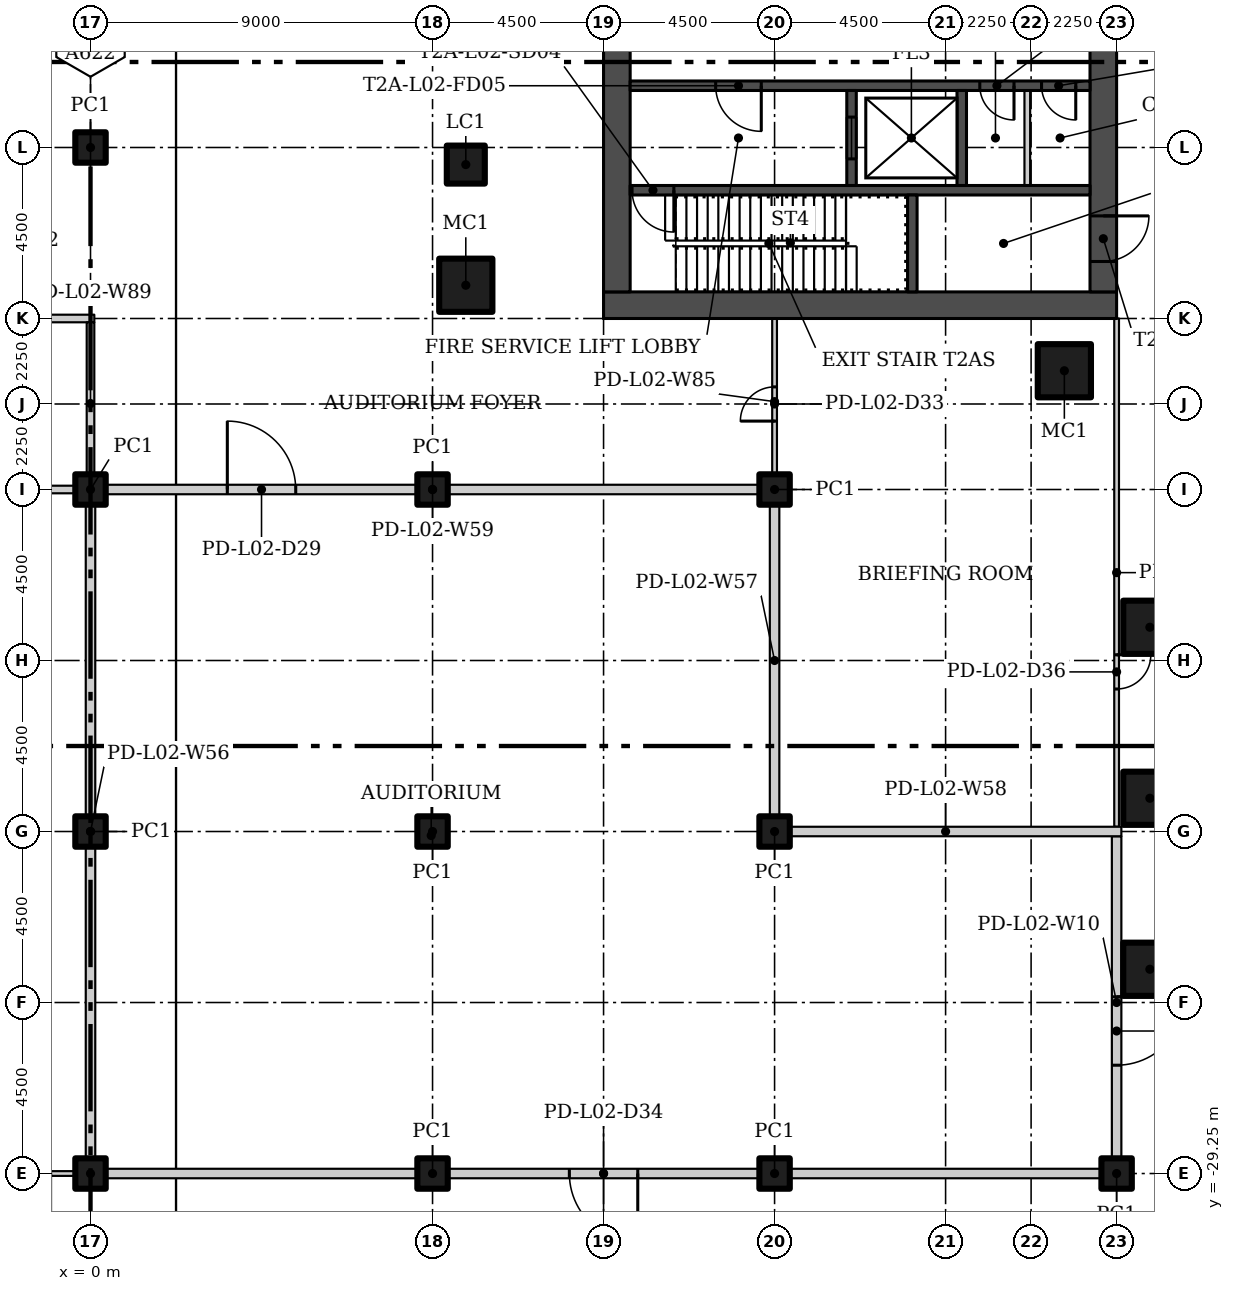
"""IFC4 building model, lengths in metres.
Left out: names, types, materials, properties, quantities, classifications, styles, units other than length and angle.
Written with IfcOpenShell. Run it as: python <this file> out.ifc"""

import sys

from ifc_helpers import new_model, si_unit, direction, frame, frame_2d, origin, origin_2d, place, context, subcontext, project, spatial, rectangle, hollow_rectangle, extrude, element, fill, save


model = new_model("IFC4")
c1 = context("Model", 3, precision=1e-05, world=origin(), true_north=direction((0.0, 1.0)))
c2 = subcontext(c1, "Body", "Model", "MODEL_VIEW")
j1 = project(units=[si_unit("LENGTHUNIT", "METRE"), si_unit("PLANEANGLEUNIT", "RADIAN")], contexts=[c1])
p1 = place(None, origin())
s1 = spatial("IfcSite", under=j1, at=p1, CompositionType="ELEMENT")
p2 = place(p1, origin())
s2 = spatial("IfcBuilding", under=s1, at=p2, CompositionType="ELEMENT")
p3 = place(p2, frame((0.0, 0.0, 12.5)))
s3 = spatial("IfcBuildingStorey", under=s2, at=p3, CompositionType="ELEMENT", Elevation=12.5)
for number, where in (
    (1, (25.625, -8.125, 0.0)),
    (2, (27.875, -14.875, 0.0)),
    (3, (27.875, -19.375, 0.0)),
    (4, (27.875, -23.875, 0.0)),
    (5, (9.875, -5.875, 0.0)),
):
    element("IfcColumn", number, at=place(p3, frame(where)), inside=s3, PredefinedType="COLUMN", context=c2, shape_type="SweptSolid", body=[
        extrude(hollow_rectangle(XDim=1.4, YDim=1.4, WallThickness=0.06, at=origin_2d()), origin(), (0.0, 0.0, 1.0), 5.6),
    ])
for number, where in (
    (6, (0.0, -29.25, 0.0)),
    (7, (0.0, -20.25, 0.0)),
    (8, (0.0, -11.25, 0.0)),
    (9, (0.0, -2.25, 0.0)),
    (10, (9.0, -29.25, 0.0)),
    (11, (9.0, -20.25, 0.0)),
    (12, (9.0, -11.25, 0.0)),
    (13, (18.0, -29.25, 0.0)),
    (14, (18.0, -20.25, 0.0)),
    (15, (18.0, -11.25, 0.0)),
    (16, (27.0, -29.25, 0.0)),
):
    element("IfcColumn", number, at=place(p3, frame(where)), inside=s3, PredefinedType="COLUMN", context=c2, shape_type="SweptSolid", body=[
        extrude(hollow_rectangle(XDim=0.8, YDim=0.8, WallThickness=0.03, at=origin_2d()), origin(), (0.0, 0.0, 1.0), 5.6),
    ])
p4 = place(p3, frame((9.875, -2.7, 0.0)))
e17 = element("IfcColumn", 17, at=p4, inside=s3, PredefinedType="COLUMN", context=c2, shape_type="SweptSolid", body=[
    extrude(hollow_rectangle(XDim=1.0, YDim=1.0, WallThickness=0.04, at=origin_2d()), origin(), (0.0, 0.0, 1.0), 5.6),
])
p5 = place(p3, frame((27.0, -20.375, 0.0), z_axis=(0.0, 0.0, 1.0), x_axis=(0.0, -1.0, 0.0)))
e18 = element("IfcWall", 18, at=p5, inside=s3, PredefinedType="PARTITIONING", context=c2, shape_type="SweptSolid", body=[
    extrude(rectangle(XDim=8.75, YDim=0.25, at=frame_2d((4.375, 0.0))), origin(), (0.0, 0.0, 1.0), 5.6),
])
p6 = place(p5, frame((4.225, 0.0, 0.0)))
e19 = element("IfcOpeningElement", 19, at=p6, cuts=e18, PredefinedType="OPENING", context=c2, shape_type="SweptSolid", body=[
    extrude(rectangle(XDim=1.8, YDim=2.4, at=frame_2d((0.9, 1.2))), frame((0.0, 0.135, 0.0), z_axis=(0.0, -1.0, 0.0), x_axis=(1.0, 0.0, 0.0)), (0.0, 0.0, 1.0), 0.27),
])
p7 = place(p3, frame((27.0, -6.75, 0.0), z_axis=(0.0, 0.0, 1.0), x_axis=(0.0, -1.0, 0.0)))
e20 = element("IfcWall", 20, at=p7, inside=s3, PredefinedType="PARTITIONING", context=c2, shape_type="SweptSolid", body=[
    extrude(rectangle(XDim=13.375, YDim=0.125, at=frame_2d((6.688, 0.0))), origin(), (0.0, 0.0, 1.0), 5.6),
])
p8 = place(p7, frame((8.85, 0.0, 0.0)))
e21 = element("IfcOpeningElement", 21, at=p8, cuts=e20, PredefinedType="OPENING", context=c2, shape_type="SweptSolid", body=[
    extrude(rectangle(XDim=0.9, YDim=2.1, at=frame_2d((0.45, 1.05))), frame((0.0, 0.073, 0.0), z_axis=(0.0, -1.0, 0.0), x_axis=(1.0, 0.0, 0.0)), (0.0, 0.0, 1.0), 0.145),
])
p9 = place(p3, frame((0.1, -6.75, 0.0), z_axis=(0.0, 0.0, 1.0), x_axis=(-1.0, 0.0, 0.0)))
e22 = element("IfcWall", 22, at=p9, inside=s3, PredefinedType="PARTITIONING", context=c2, shape_type="SweptSolid", body=[
    extrude(rectangle(XDim=9.2, YDim=0.2, at=frame_2d((4.6, 0.0))), origin(), (0.0, 0.0, 1.0), 5.6),
])
p10 = place(p9, frame((3.25, 0.0, 0.0)))
e23 = element("IfcOpeningElement", 23, at=p10, cuts=e22, PredefinedType="OPENING", context=c2, shape_type="SweptSolid", body=[
    extrude(rectangle(XDim=1.5, YDim=2.1, at=frame_2d((0.75, 1.05))), frame((0.0, 0.11, 0.0), z_axis=(0.0, -1.0, 0.0), x_axis=(1.0, 0.0, 0.0)), (0.0, 0.0, 1.0), 0.22),
])
p11 = place(p3, frame((27.125, -29.25, 0.0), z_axis=(0.0, 0.0, 1.0), x_axis=(-1.0, 0.0, 0.0)))
e24 = element("IfcWall", 24, at=p11, inside=s3, PredefinedType="PARTITIONING", context=c2, shape_type="SweptSolid", body=[
    extrude(rectangle(XDim=27.25, YDim=0.25, at=frame_2d((13.625, 0.0))), origin(), (0.0, 0.0, 1.0), 5.6),
])
p12 = place(p11, frame((12.725, 0.0, 0.0)))
e25 = element("IfcOpeningElement", 25, at=p12, cuts=e24, PredefinedType="OPENING", context=c2, shape_type="SweptSolid", body=[
    extrude(rectangle(XDim=1.8, YDim=2.4, at=frame_2d((0.9, 1.2))), frame((0.0, 0.135, 0.0), z_axis=(0.0, -1.0, 0.0), x_axis=(1.0, 0.0, 0.0)), (0.0, 0.0, 1.0), 0.27),
])
p13 = place(p3, frame((0.125, -29.25, 0.0), z_axis=(0.0, 0.0, 1.0), x_axis=(-1.0, 0.0, 0.0)))
e26 = element("IfcWall", 26, at=p13, inside=s3, PredefinedType="PARTITIONING", context=c2, shape_type="SweptSolid", body=[
    extrude(rectangle(XDim=9.225, YDim=0.125, at=frame_2d((4.613, 0.0))), origin(), (0.0, 0.0, 1.0), 5.6),
])
p14 = place(p13, frame((1.175, 0.0, 0.0)))
e27 = element("IfcOpeningElement", 27, at=p14, cuts=e26, PredefinedType="OPENING", context=c2, shape_type="SweptSolid", body=[
    extrude(rectangle(XDim=1.5, YDim=2.1, at=frame_2d((0.75, 1.05))), frame((0.0, 0.073, 0.0), z_axis=(0.0, -1.0, 0.0), x_axis=(1.0, 0.0, 0.0)), (0.0, 0.0, 1.0), 0.145),
])
p15 = place(p13, frame((6.575, 0.0, 0.0)))
e28 = element("IfcOpeningElement", 28, at=p15, cuts=e26, PredefinedType="OPENING", context=c2, shape_type="SweptSolid", body=[
    extrude(rectangle(XDim=1.5, YDim=2.1, at=frame_2d((0.75, 1.05))), frame((0.0, 0.073, 0.0), z_axis=(0.0, -1.0, 0.0), x_axis=(1.0, 0.0, 0.0)), (0.0, 0.0, 1.0), 0.145),
])
p16 = place(p3, frame((0.0, -11.375, 0.0), z_axis=(0.0, 0.0, 1.0), x_axis=(0.0, -1.0, 0.0)))
e29 = element("IfcWall", 29, at=p16, inside=s3, PredefinedType="PARTITIONING", context=c2, shape_type="SweptSolid", body=[
    extrude(rectangle(XDim=17.75, YDim=0.25, at=frame_2d((8.875, 0.0))), origin(), (0.0, 0.0, 1.0), 5.6),
])
p17 = place(p3, frame((18.0, -20.125, 0.0), z_axis=(0.0, 0.0, 1.0), x_axis=(0.0, 1.0, 0.0)))
e30 = element("IfcWall", 30, at=p17, inside=s3, PredefinedType="PARTITIONING", context=c2, shape_type="SweptSolid", body=[
    extrude(rectangle(XDim=8.75, YDim=0.25, at=frame_2d((4.375, 0.0))), origin(), (0.0, 0.0, 1.0), 5.6),
])
p18 = place(p3, frame((27.125, -20.25, 0.0), z_axis=(0.0, 0.0, 1.0), x_axis=(-1.0, 0.0, 0.0)))
e31 = element("IfcWall", 31, at=p18, inside=s3, PredefinedType="PARTITIONING", context=c2, shape_type="SweptSolid", body=[
    extrude(rectangle(XDim=9.25, YDim=0.25, at=frame_2d((4.625, 0.0))), origin(), (0.0, 0.0, 1.0), 5.6),
])
p19 = place(p3, frame((-0.125, -11.25, 0.0)))
e32 = element("IfcWall", 32, at=p19, inside=s3, PredefinedType="PARTITIONING", context=c2, shape_type="SweptSolid", body=[
    extrude(rectangle(XDim=18.25, YDim=0.25, at=frame_2d((9.125, 0.0))), origin(), (0.0, 0.0, 1.0), 5.6),
])
p20 = place(p19, frame((3.725, 0.0, 0.0)))
e33 = element("IfcOpeningElement", 33, at=p20, cuts=e32, PredefinedType="OPENING", context=c2, shape_type="SweptSolid", body=[
    extrude(rectangle(XDim=1.8, YDim=2.4, at=frame_2d((0.9, 1.2))), frame((0.0, 0.135, 0.0), z_axis=(0.0, -1.0, 0.0), x_axis=(1.0, 0.0, 0.0)), (0.0, 0.0, 1.0), 0.27),
])
p21 = place(p3, frame((0.125, -11.25, 0.0), z_axis=(0.0, 0.0, 1.0), x_axis=(-1.0, 0.0, 0.0)))
e34 = element("IfcWall", 34, at=p21, inside=s3, PredefinedType="PARTITIONING", context=c2, shape_type="SweptSolid", body=[
    extrude(rectangle(XDim=27.225, YDim=0.2, at=frame_2d((13.613, 0.0))), origin(), (0.0, 0.0, 1.0), 5.6),
])
p22 = place(p3, frame((18.0, -11.125, 0.0), z_axis=(0.0, 0.0, 1.0), x_axis=(0.0, 1.0, 0.0)))
e35 = element("IfcWall", 35, at=p22, inside=s3, PredefinedType="PARTITIONING", context=c2, shape_type="SweptSolid", body=[
    extrude(rectangle(XDim=4.375, YDim=0.125, at=frame_2d((2.188, 0.0))), origin(), (0.0, 0.0, 1.0), 5.6),
])
p23 = place(p22, frame((1.675, 0.0, 0.0)))
e36 = element("IfcOpeningElement", 36, at=p23, cuts=e35, PredefinedType="OPENING", context=c2, shape_type="SweptSolid", body=[
    extrude(rectangle(XDim=0.9, YDim=2.1, at=frame_2d((0.45, 1.05))), frame((0.0, 0.073, 0.0), z_axis=(0.0, -1.0, 0.0), x_axis=(1.0, 0.0, 0.0)), (0.0, 0.0, 1.0), 0.145),
])
p24 = place(p3, frame((0.0, -11.125, 0.0), z_axis=(0.0, 0.0, 1.0), x_axis=(0.0, 1.0, 0.0)))
e37 = element("IfcWall", 37, at=p24, inside=s3, PredefinedType="PARTITIONING", context=c2, shape_type="SweptSolid", body=[
    extrude(rectangle(XDim=4.275, YDim=0.2, at=frame_2d((2.137, 0.0))), origin(), (0.0, 0.0, 1.0), 5.6),
])
p25 = place(p3, frame((13.5, -6.4, 0.0)))
e38 = element("IfcWall", 38, at=p25, inside=s3, PredefinedType="SHEAR", context=c2, shape_type="SweptSolid", body=[
    extrude(rectangle(XDim=13.5, YDim=0.7, at=frame_2d((6.75, 0.0))), origin(), (0.0, 0.0, 1.0), 5.6),
])
p26 = place(p3, frame((13.85, 6.05, 0.0), z_axis=(0.0, 0.0, 1.0), x_axis=(0.0, -1.0, 0.0)))
e39 = element("IfcWall", 39, at=p26, inside=s3, PredefinedType="SHEAR", context=c2, shape_type="SweptSolid", body=[
    extrude(rectangle(XDim=12.1, YDim=0.7, at=frame_2d((6.05, 0.0))), origin(), (0.0, 0.0, 1.0), 5.6),
])
p27 = place(p26, frame((3.9, 0.0, 0.0)))
e40 = element("IfcOpeningElement", 40, at=p27, cuts=e39, PredefinedType="OPENING", context=c2, shape_type="SweptSolid", body=[
    extrude(rectangle(XDim=1.8, YDim=2.4, at=frame_2d((0.9, 1.2))), frame((0.0, 0.36, 0.0), z_axis=(0.0, -1.0, 0.0), x_axis=(1.0, 0.0, 0.0)), (0.0, 0.0, 1.0), 0.72),
])
p28 = place(p3, frame((26.65, 6.05, 0.0), z_axis=(0.0, 0.0, 1.0), x_axis=(0.0, -1.0, 0.0)))
e41 = element("IfcWall", 41, at=p28, inside=s3, PredefinedType="SHEAR", context=c2, shape_type="SweptSolid", body=[
    extrude(rectangle(XDim=12.1, YDim=0.7, at=frame_2d((6.05, 0.0))), origin(), (0.0, 0.0, 1.0), 5.6),
])
p29 = place(p28, frame((10.1, 0.0, 0.0)))
e42 = element("IfcOpeningElement", 42, at=p29, cuts=e41, PredefinedType="OPENING", context=c2, shape_type="SweptSolid", body=[
    extrude(rectangle(XDim=1.2, YDim=2.1, at=frame_2d((0.6, 1.05))), frame((0.0, 0.36, 0.0), z_axis=(0.0, -1.0, 0.0), x_axis=(1.0, 0.0, 0.0)), (0.0, 0.0, 1.0), 0.72),
])
p30 = place(p28, frame((3.9, 0.0, 0.0)))
e43 = element("IfcOpeningElement", 43, at=p30, cuts=e41, PredefinedType="OPENING", context=c2, shape_type="SweptSolid", body=[
    extrude(rectangle(XDim=1.8, YDim=2.4, at=frame_2d((0.9, 1.2))), frame((0.0, 0.36, 0.0), z_axis=(0.0, -1.0, 0.0), x_axis=(1.0, 0.0, 0.0)), (0.0, 0.0, 1.0), 0.72),
])
p31 = place(p3, frame((26.3, -3.375, 0.0), z_axis=(0.0, 0.0, 1.0), x_axis=(-1.0, 0.0, 0.0)))
e44 = element("IfcWall", 44, at=p31, inside=s3, PredefinedType="SHEAR", context=c2, shape_type="SweptSolid", body=[
    extrude(rectangle(XDim=12.1, YDim=0.25, at=frame_2d((6.05, 0.0))), origin(), (0.0, 0.0, 1.0), 5.6),
])
p32 = place(p31, frame((10.95, 0.0, 0.0)))
e45 = element("IfcOpeningElement", 45, at=p32, cuts=e44, PredefinedType="OPENING", context=c2, shape_type="SweptSolid", body=[
    extrude(rectangle(XDim=1.1, YDim=2.1, at=frame_2d((0.55, 1.05))), frame((0.0, 0.135, 0.0), z_axis=(0.0, -1.0, 0.0), x_axis=(1.0, 0.0, 0.0)), (0.0, 0.0, 1.0), 0.27),
])
p33 = place(p3, frame((21.625, -6.05, 0.0), z_axis=(0.0, 0.0, 1.0), x_axis=(0.0, 1.0, 0.0)))
e46 = element("IfcWall", 46, at=p33, inside=s3, PredefinedType="SHEAR", context=c2, shape_type="SweptSolid", body=[
    extrude(rectangle(XDim=2.55, YDim=0.25, at=frame_2d((1.275, 0.0))), origin(), (0.0, 0.0, 1.0), 5.6),
])
p34 = place(p3, frame((26.3, -0.625, 0.0), z_axis=(0.0, 0.0, 1.0), x_axis=(-1.0, 0.0, 0.0)))
e47 = element("IfcWall", 47, at=p34, inside=s3, PredefinedType="SHEAR", context=c2, shape_type="SweptSolid", body=[
    extrude(rectangle(XDim=12.1, YDim=0.25, at=frame_2d((6.05, 0.0))), origin(), (0.0, 0.0, 1.0), 5.6),
])
p35 = place(p34, frame((8.65, 0.0, 0.0)))
e48 = element("IfcOpeningElement", 48, at=p35, cuts=e47, PredefinedType="OPENING", context=c2, shape_type="SweptSolid", body=[
    extrude(rectangle(XDim=1.2, YDim=2.1, at=frame_2d((0.6, 1.05))), frame((0.0, 0.135, 0.0), z_axis=(0.0, -1.0, 0.0), x_axis=(1.0, 0.0, 0.0)), (0.0, 0.0, 1.0), 0.27),
])
p36 = place(p34, frame((2.0, 0.0, 0.0)))
e49 = element("IfcOpeningElement", 49, at=p36, cuts=e47, PredefinedType="OPENING", context=c2, shape_type="SweptSolid", body=[
    extrude(rectangle(XDim=0.9, YDim=2.1, at=frame_2d((0.45, 1.05))), frame((0.0, 0.135, 0.0), z_axis=(0.0, -1.0, 0.0), x_axis=(1.0, 0.0, 0.0)), (0.0, 0.0, 1.0), 0.27),
])
p37 = place(p34, frame((0.375, 0.0, 0.0)))
e50 = element("IfcOpeningElement", 50, at=p37, cuts=e47, PredefinedType="OPENING", context=c2, shape_type="SweptSolid", body=[
    extrude(rectangle(XDim=0.9, YDim=2.1, at=frame_2d((0.45, 1.05))), frame((0.0, 0.135, 0.0), z_axis=(0.0, -1.0, 0.0), x_axis=(1.0, 0.0, 0.0)), (0.0, 0.0, 1.0), 0.27),
])
p38 = place(p3, frame((20.025, -3.25, 0.0), z_axis=(0.0, 0.0, 1.0), x_axis=(0.0, 1.0, 0.0)))
e51 = element("IfcWall", 51, at=p38, inside=s3, PredefinedType="SHEAR", context=c2, shape_type="SweptSolid", body=[
    extrude(rectangle(XDim=2.5, YDim=0.25, at=frame_2d((1.25, 0.0))), origin(), (0.0, 0.0, 1.0), 5.6),
])
p39 = place(p38, frame((0.7, 0.0, 0.0)))
e52 = element("IfcOpeningElement", 52, at=p39, cuts=e51, PredefinedType="OPENING", context=c2, shape_type="SweptSolid", body=[
    extrude(rectangle(XDim=1.1, YDim=2.1, at=frame_2d((0.55, 1.05))), frame((0.0, 0.135, 0.0), z_axis=(0.0, -1.0, 0.0), x_axis=(1.0, 0.0, 0.0)), (0.0, 0.0, 1.0), 0.27),
])
p40 = place(p3, frame((22.925, -3.25, 0.0), z_axis=(0.0, 0.0, 1.0), x_axis=(0.0, 1.0, 0.0)))
e53 = element("IfcWall", 53, at=p40, inside=s3, PredefinedType="SHEAR", context=c2, shape_type="SweptSolid", body=[
    extrude(rectangle(XDim=2.5, YDim=0.25, at=frame_2d((1.25, 0.0))), origin(), (0.0, 0.0, 1.0), 5.6),
])
p41 = place(p3, frame((24.65, -3.25, 0.0), z_axis=(0.0, 0.0, 1.0), x_axis=(0.0, 1.0, 0.0)))
e54 = element("IfcWall", 54, at=p41, inside=s3, PredefinedType="PARTITIONING", context=c2, shape_type="SweptSolid", body=[
    extrude(rectangle(XDim=2.5, YDim=0.15, at=frame_2d((1.25, 0.0))), origin(), (0.0, 0.0, 1.0), 5.6),
])
p42 = place(p20, origin())
e55 = element("IfcDoor", 55, at=p42, inside=s3, OperationType="DOUBLE_DOOR_SINGLE_SWING", PredefinedType="DOOR", context=c2, shape_type="SweptSolid", body=[
    extrude(rectangle(XDim=1.8, YDim=2.4, at=frame_2d((0.9, 1.2))), frame((0.0, 0.025, 0.0), z_axis=(0.0, -1.0, 0.0), x_axis=(1.0, 0.0, 0.0)), (0.0, 0.0, 1.0), 0.05),
])
fill(e33, e55)
p43 = place(p23, origin())
e56 = element("IfcDoor", 56, at=p43, inside=s3, OperationType="SINGLE_SWING_RIGHT", PredefinedType="DOOR", context=c2, shape_type="SweptSolid", body=[
    extrude(rectangle(XDim=0.9, YDim=2.1, at=frame_2d((0.45, 1.05))), frame((0.0, 0.025, 0.0), z_axis=(0.0, -1.0, 0.0), x_axis=(1.0, 0.0, 0.0)), (0.0, 0.0, 1.0), 0.05),
])
fill(e36, e56)
p44 = place(p12, origin())
e57 = element("IfcDoor", 57, at=p44, inside=s3, OperationType="DOUBLE_DOOR_SINGLE_SWING", PredefinedType="DOOR", context=c2, shape_type="SweptSolid", body=[
    extrude(rectangle(XDim=1.8, YDim=2.4, at=frame_2d((0.9, 1.2))), frame((0.0, 0.025, 0.0), z_axis=(0.0, -1.0, 0.0), x_axis=(1.0, 0.0, 0.0)), (0.0, 0.0, 1.0), 0.05),
])
fill(e25, e57)
p45 = place(p6, origin())
e58 = element("IfcDoor", 58, at=p45, inside=s3, OperationType="DOUBLE_DOOR_SINGLE_SWING", PredefinedType="DOOR", context=c2, shape_type="SweptSolid", body=[
    extrude(rectangle(XDim=1.8, YDim=2.4, at=frame_2d((0.9, 1.2))), frame((0.0, 0.025, 0.0), z_axis=(0.0, -1.0, 0.0), x_axis=(1.0, 0.0, 0.0)), (0.0, 0.0, 1.0), 0.05),
])
fill(e19, e58)
p46 = place(p8, origin())
e59 = element("IfcDoor", 59, at=p46, inside=s3, OperationType="SINGLE_SWING_RIGHT", PredefinedType="DOOR", context=c2, shape_type="SweptSolid", body=[
    extrude(rectangle(XDim=0.9, YDim=2.1, at=frame_2d((0.45, 1.05))), frame((0.0, 0.025, 0.0), z_axis=(0.0, -1.0, 0.0), x_axis=(1.0, 0.0, 0.0)), (0.0, 0.0, 1.0), 0.05),
])
fill(e21, e59)
p47 = place(p29, origin())
e60 = element("IfcDoor", 60, at=p47, inside=s3, OperationType="SINGLE_SWING_RIGHT", PredefinedType="DOOR", context=c2, shape_type="SweptSolid", body=[
    extrude(rectangle(XDim=1.2, YDim=2.1, at=frame_2d((0.6, 1.05))), frame((0.0, 0.025, 0.0), z_axis=(0.0, -1.0, 0.0), x_axis=(1.0, 0.0, 0.0)), (0.0, 0.0, 1.0), 0.05),
])
fill(e42, e60)
p48 = place(p32, origin())
e61 = element("IfcDoor", 61, at=p48, inside=s3, OperationType="SINGLE_SWING_RIGHT", PredefinedType="DOOR", context=c2, shape_type="SweptSolid", body=[
    extrude(rectangle(XDim=1.1, YDim=2.1, at=frame_2d((0.55, 1.05))), frame((0.0, 0.025, 0.0), z_axis=(0.0, -1.0, 0.0), x_axis=(1.0, 0.0, 0.0)), (0.0, 0.0, 1.0), 0.05),
])
fill(e45, e61)
p49 = place(p35, origin())
e62 = element("IfcDoor", 62, at=p49, inside=s3, OperationType="SINGLE_SWING_RIGHT", PredefinedType="DOOR", context=c2, shape_type="SweptSolid", body=[
    extrude(rectangle(XDim=1.2, YDim=2.1, at=frame_2d((0.6, 1.05))), frame((0.0, 0.025, 0.0), z_axis=(0.0, -1.0, 0.0), x_axis=(1.0, 0.0, 0.0)), (0.0, 0.0, 1.0), 0.05),
])
fill(e48, e62)
p50 = place(p36, origin())
e63 = element("IfcDoor", 63, at=p50, inside=s3, OperationType="SINGLE_SWING_LEFT", PredefinedType="DOOR", context=c2, shape_type="SweptSolid", body=[
    extrude(rectangle(XDim=0.9, YDim=2.1, at=frame_2d((0.45, 1.05))), frame((0.0, 0.025, 0.0), z_axis=(0.0, -1.0, 0.0), x_axis=(1.0, 0.0, 0.0)), (0.0, 0.0, 1.0), 0.05),
])
fill(e49, e63)
p51 = place(p37, origin())
e64 = element("IfcDoor", 64, at=p51, inside=s3, OperationType="SINGLE_SWING_LEFT", PredefinedType="DOOR", context=c2, shape_type="SweptSolid", body=[
    extrude(rectangle(XDim=0.9, YDim=2.1, at=frame_2d((0.45, 1.05))), frame((0.0, 0.025, 0.0), z_axis=(0.0, -1.0, 0.0), x_axis=(1.0, 0.0, 0.0)), (0.0, 0.0, 1.0), 0.05),
])
fill(e50, e64)
p52 = place(p39, origin())
e65 = element("IfcDoor", 65, at=p52, inside=s3, OperationType="SLIDING_TO_LEFT", PredefinedType="DOOR", context=c2, shape_type="SweptSolid", body=[
    extrude(rectangle(XDim=1.1, YDim=2.1, at=frame_2d((0.55, 1.05))), frame((0.0, 0.025, 0.0), z_axis=(0.0, -1.0, 0.0), x_axis=(1.0, 0.0, 0.0)), (0.0, 0.0, 1.0), 0.05),
])
fill(e52, e65)
save(model, sys.argv[1])
